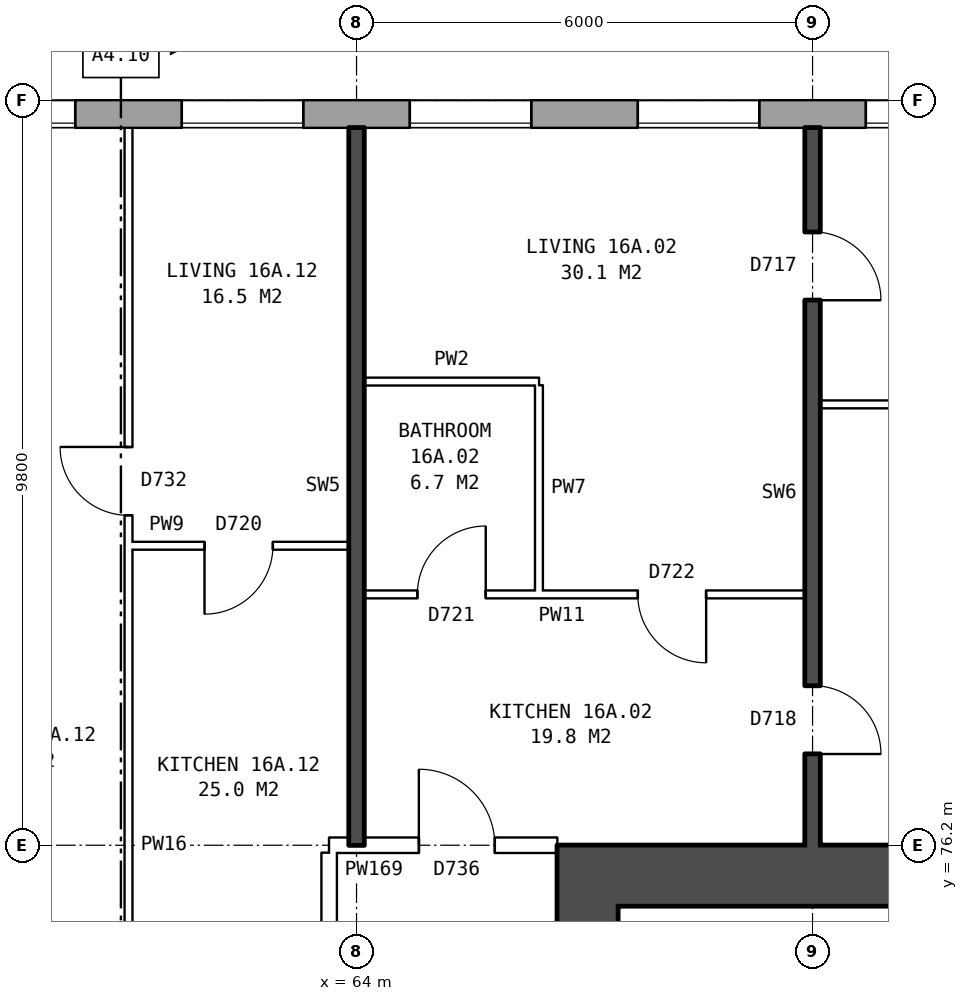
"""IFC4 building model, lengths in metres.
Left out: names, types, materials, properties, quantities, classifications, styles, units other than length and angle.
Written with IfcOpenShell. Run it as: python <this file> out.ifc"""

import sys

from ifc_helpers import new_model, si_unit, direction, frame, frame_2d, origin, place, context, subcontext, project, spatial, rectangle, extrude, element, fill, save


model = new_model("IFC4")
c1 = context("Model", 3, precision=1e-05, world=origin(), true_north=direction((0.0, 1.0)))
c2 = subcontext(c1, "Body", "Model", "MODEL_VIEW")
j1 = project(units=[si_unit("LENGTHUNIT", "METRE"), si_unit("PLANEANGLEUNIT", "RADIAN")], contexts=[c1])
p1 = place(None, origin())
s1 = spatial("IfcSite", under=j1, at=p1, CompositionType="ELEMENT")
p2 = place(p1, origin())
s2 = spatial("IfcBuilding", under=s1, at=p2, CompositionType="ELEMENT")
p3 = place(p2, frame((0.0, 0.0, 59.8)))
s3 = spatial("IfcBuildingStorey", under=s2, at=p3, CompositionType="ELEMENT", Elevation=59.8)
p4 = place(p3, frame((72.925, 85.82, 0.0), z_axis=(0.0, 0.0, 1.0), x_axis=(-1.0, 0.0, 0.0)))
e1 = element("IfcWall", 1, at=p4, inside=s3, PredefinedType="STANDARD", context=c2, shape_type="SweptSolid", body=[
    extrude(rectangle(XDim=48.351, YDim=0.36, at=frame_2d((24.175, 0.0))), origin(), (0.0, 0.0, 1.0), 2.85),
])
p5 = place(p4, frame((0.625, 0.0, 0.8)))
e2 = element("IfcOpeningElement", 2, at=p5, cuts=e1, PredefinedType="OPENING", context=c2, shape_type="SweptSolid", body=[
    extrude(rectangle(XDim=1.6, YDim=1.8, at=frame_2d((0.8, 0.9))), frame((0.0, 0.19, 0.0), z_axis=(0.0, -1.0, 0.0), x_axis=(1.0, 0.0, 0.0)), (0.0, 0.0, 1.0), 0.38),
])
p6 = place(p4, frame((3.625, 0.0, 0.8)))
e3 = element("IfcOpeningElement", 3, at=p6, cuts=e1, PredefinedType="OPENING", context=c2, shape_type="SweptSolid", body=[
    extrude(rectangle(XDim=1.6, YDim=1.8, at=frame_2d((0.8, 0.9))), frame((0.0, 0.19, 0.0), z_axis=(0.0, -1.0, 0.0), x_axis=(1.0, 0.0, 0.0)), (0.0, 0.0, 1.0), 0.38),
])
p7 = place(p4, frame((6.625, 0.0, 0.8)))
e4 = element("IfcOpeningElement", 4, at=p7, cuts=e1, PredefinedType="OPENING", context=c2, shape_type="SweptSolid", body=[
    extrude(rectangle(XDim=1.6, YDim=1.8, at=frame_2d((0.8, 0.9))), frame((0.0, 0.19, 0.0), z_axis=(0.0, -1.0, 0.0), x_axis=(1.0, 0.0, 0.0)), (0.0, 0.0, 1.0), 0.38),
])
p8 = place(p4, frame((9.625, 0.0, 0.8)))
e5 = element("IfcOpeningElement", 5, at=p8, cuts=e1, PredefinedType="OPENING", context=c2, shape_type="SweptSolid", body=[
    extrude(rectangle(XDim=1.6, YDim=1.8, at=frame_2d((0.8, 0.9))), frame((0.0, 0.19, 0.0), z_axis=(0.0, -1.0, 0.0), x_axis=(1.0, 0.0, 0.0)), (0.0, 0.0, 1.0), 0.38),
])
p9 = place(p4, frame((12.625, 0.0, 0.8)))
e6 = element("IfcOpeningElement", 6, at=p9, cuts=e1, PredefinedType="OPENING", context=c2, shape_type="SweptSolid", body=[
    extrude(rectangle(XDim=1.6, YDim=1.8, at=frame_2d((0.8, 0.9))), frame((0.0, 0.19, 0.0), z_axis=(0.0, -1.0, 0.0), x_axis=(1.0, 0.0, 0.0)), (0.0, 0.0, 1.0), 0.38),
])
p10 = place(p4, frame((15.625, 0.0, 0.8)))
e7 = element("IfcOpeningElement", 7, at=p10, cuts=e1, PredefinedType="OPENING", context=c2, shape_type="SweptSolid", body=[
    extrude(rectangle(XDim=1.6, YDim=1.8, at=frame_2d((0.8, 0.9))), frame((0.0, 0.19, 0.0), z_axis=(0.0, -1.0, 0.0), x_axis=(1.0, 0.0, 0.0)), (0.0, 0.0, 1.0), 0.38),
])
p11 = place(p4, frame((18.625, 0.0, 0.8)))
e8 = element("IfcOpeningElement", 8, at=p11, cuts=e1, PredefinedType="OPENING", context=c2, shape_type="SweptSolid", body=[
    extrude(rectangle(XDim=1.6, YDim=1.8, at=frame_2d((0.8, 0.9))), frame((0.0, 0.19, 0.0), z_axis=(0.0, -1.0, 0.0), x_axis=(1.0, 0.0, 0.0)), (0.0, 0.0, 1.0), 0.38),
])
p12 = place(p4, frame((21.125, 0.0, 1.65)))
e9 = element("IfcOpeningElement", 9, at=p12, cuts=e1, PredefinedType="OPENING", context=c2, shape_type="SweptSolid", body=[
    extrude(rectangle(XDim=0.8, YDim=0.9, at=frame_2d((0.4, 0.45))), frame((0.0, 0.19, 0.0), z_axis=(0.0, -1.0, 0.0), x_axis=(1.0, 0.0, 0.0)), (0.0, 0.0, 1.0), 0.38),
])
p13 = place(p4, frame((24.075, 0.0, 0.25)))
e10 = element("IfcOpeningElement", 10, at=p13, cuts=e1, PredefinedType="OPENING", context=c2, shape_type="SweptSolid", body=[
    extrude(rectangle(XDim=0.8, YDim=1.5, at=frame_2d((0.4, 0.75))), frame((0.0, 0.19, 0.0), z_axis=(0.0, -1.0, 0.0), x_axis=(1.0, 0.0, 0.0)), (0.0, 0.0, 1.0), 0.38),
])
p14 = place(p4, frame((27.625, 0.0, 0.8)))
e11 = element("IfcOpeningElement", 11, at=p14, cuts=e1, PredefinedType="OPENING", context=c2, shape_type="SweptSolid", body=[
    extrude(rectangle(XDim=1.6, YDim=1.8, at=frame_2d((0.8, 0.9))), frame((0.0, 0.19, 0.0), z_axis=(0.0, -1.0, 0.0), x_axis=(1.0, 0.0, 0.0)), (0.0, 0.0, 1.0), 0.38),
])
p15 = place(p4, frame((30.625, 0.0, 0.8)))
e12 = element("IfcOpeningElement", 12, at=p15, cuts=e1, PredefinedType="OPENING", context=c2, shape_type="SweptSolid", body=[
    extrude(rectangle(XDim=1.6, YDim=1.8, at=frame_2d((0.8, 0.9))), frame((0.0, 0.19, 0.0), z_axis=(0.0, -1.0, 0.0), x_axis=(1.0, 0.0, 0.0)), (0.0, 0.0, 1.0), 0.38),
])
p16 = place(p4, frame((33.625, 0.0, 0.8)))
e13 = element("IfcOpeningElement", 13, at=p16, cuts=e1, PredefinedType="OPENING", context=c2, shape_type="SweptSolid", body=[
    extrude(rectangle(XDim=1.6, YDim=1.8, at=frame_2d((0.8, 0.9))), frame((0.0, 0.19, 0.0), z_axis=(0.0, -1.0, 0.0), x_axis=(1.0, 0.0, 0.0)), (0.0, 0.0, 1.0), 0.38),
])
p17 = place(p4, frame((36.625, 0.0, 0.8)))
e14 = element("IfcOpeningElement", 14, at=p17, cuts=e1, PredefinedType="OPENING", context=c2, shape_type="SweptSolid", body=[
    extrude(rectangle(XDim=1.6, YDim=1.8, at=frame_2d((0.8, 0.9))), frame((0.0, 0.19, 0.0), z_axis=(0.0, -1.0, 0.0), x_axis=(1.0, 0.0, 0.0)), (0.0, 0.0, 1.0), 0.38),
])
p18 = place(p4, frame((39.625, 0.0, 0.8)))
e15 = element("IfcOpeningElement", 15, at=p18, cuts=e1, PredefinedType="OPENING", context=c2, shape_type="SweptSolid", body=[
    extrude(rectangle(XDim=1.6, YDim=1.8, at=frame_2d((0.8, 0.9))), frame((0.0, 0.19, 0.0), z_axis=(0.0, -1.0, 0.0), x_axis=(1.0, 0.0, 0.0)), (0.0, 0.0, 1.0), 0.38),
])
p19 = place(p4, frame((42.625, 0.0, 0.8)))
e16 = element("IfcOpeningElement", 16, at=p19, cuts=e1, PredefinedType="OPENING", context=c2, shape_type="SweptSolid", body=[
    extrude(rectangle(XDim=1.6, YDim=1.8, at=frame_2d((0.8, 0.9))), frame((0.0, 0.19, 0.0), z_axis=(0.0, -1.0, 0.0), x_axis=(1.0, 0.0, 0.0)), (0.0, 0.0, 1.0), 0.38),
])
p20 = place(p4, frame((45.625, 0.0, 0.8)))
e17 = element("IfcOpeningElement", 17, at=p20, cuts=e1, PredefinedType="OPENING", context=c2, shape_type="SweptSolid", body=[
    extrude(rectangle(XDim=1.6, YDim=1.8, at=frame_2d((0.8, 0.9))), frame((0.0, 0.19, 0.0), z_axis=(0.0, -1.0, 0.0), x_axis=(1.0, 0.0, 0.0)), (0.0, 0.0, 1.0), 0.38),
])
p21 = place(p4, frame((22.425, 0.0, 0.15)))
e18 = element("IfcOpeningElement", 18, at=p21, cuts=e1, PredefinedType="OPENING", context=c2, shape_type="SweptSolid", body=[
    extrude(rectangle(XDim=1.2, YDim=0.9, at=frame_2d((0.6, 0.45))), frame((0.0, 0.19, 0.0), z_axis=(0.0, -1.0, 0.0), x_axis=(1.0, 0.0, 0.0)), (0.0, 0.0, 1.0), 0.38),
])
p22 = place(p4, frame((25.175, 0.0, 0.25)))
e19 = element("IfcOpeningElement", 19, at=p22, cuts=e1, PredefinedType="OPENING", context=c2, shape_type="SweptSolid", body=[
    extrude(rectangle(XDim=0.6, YDim=0.9, at=frame_2d((0.3, 0.45))), frame((0.0, 0.19, 0.0), z_axis=(0.0, -1.0, 0.0), x_axis=(1.0, 0.0, 0.0)), (0.0, 0.0, 1.0), 0.38),
])
p23 = place(p3, frame((67.04, 64.6, 0.0), z_axis=(0.0, 0.0, 1.0), x_axis=(0.0, 1.0, 0.0)))
e20 = element("IfcWall", 20, at=p23, inside=s3, PredefinedType="SHEAR", context=c2, shape_type="SweptSolid", body=[
    extrude(rectangle(XDim=10.8, YDim=0.8, at=frame_2d((5.4, 0.0))), origin(), (0.0, 0.0, 1.0), 2.85),
])
p24 = place(p23, frame((0.525, 0.0, 0.0)))
e21 = element("IfcOpeningElement", 21, at=p24, cuts=e20, PredefinedType="OPENING", context=c2, shape_type="SweptSolid", body=[
    extrude(rectangle(XDim=1.1, YDim=2.1, at=frame_2d((0.55, 1.05))), frame((0.0, 0.41, 0.0), z_axis=(0.0, -1.0, 0.0), x_axis=(1.0, 0.0, 0.0)), (0.0, 0.0, 1.0), 0.82),
])
p25 = place(p23, frame((9.1, 0.0, 0.0)))
e22 = element("IfcOpeningElement", 22, at=p25, cuts=e20, PredefinedType="OPENING", context=c2, shape_type="SweptSolid", body=[
    extrude(rectangle(XDim=1.1, YDim=2.1, at=frame_2d((0.55, 1.05))), frame((0.0, 0.41, 0.0), z_axis=(0.0, -1.0, 0.0), x_axis=(1.0, 0.0, 0.0)), (0.0, 0.0, 1.0), 0.82),
])
p26 = place(p3, frame((66.64, 75.8, 0.0), z_axis=(0.0, 0.0, 1.0), x_axis=(1.0, 0.0, 0.0)))
e23 = element("IfcWall", 23, at=p26, inside=s3, PredefinedType="SHEAR", context=c2, shape_type="SweptSolid", body=[
    extrude(rectangle(XDim=9.0, YDim=0.8, at=frame_2d((4.5, 0.0))), origin(), (0.0, 0.0, 1.0), 2.85),
])
p27 = place(p3, frame((63.64, 63.9, 0.0), z_axis=(0.0, 0.0, 1.0), x_axis=(0.0, 1.0, 0.0)))
e24 = element("IfcWall", 24, at=p27, inside=s3, PredefinedType="PARTITIONING", context=c2, shape_type="SweptSolid", body=[
    extrude(rectangle(XDim=12.2, YDim=0.2, at=frame_2d((6.1, 0.0))), origin(), (0.0, 0.0, 1.0), 2.85),
])
p28 = place(p27, frame((5.1, 0.0, 0.0)))
e25 = element("IfcOpeningElement", 25, at=p28, cuts=e24, PredefinedType="OPENING", context=c2, shape_type="SweptSolid", body=[
    extrude(rectangle(XDim=2.0, YDim=2.1, at=frame_2d((1.0, 1.05))), frame((0.0, 0.11, 0.0), z_axis=(0.0, -1.0, 0.0), x_axis=(1.0, 0.0, 0.0)), (0.0, 0.0, 1.0), 0.22),
])
p29 = place(p3, frame((63.64, 76.2, 0.0), z_axis=(0.0, 0.0, 1.0), x_axis=(1.0, 0.0, 0.0)))
e26 = element("IfcWall", 26, at=p29, inside=s3, PredefinedType="PARTITIONING", context=c2, shape_type="SweptSolid", body=[
    extrude(rectangle(XDim=3.0, YDim=0.2, at=frame_2d((1.5, 0.0))), origin(), (0.0, 0.0, 1.0), 2.85),
])
p30 = place(p29, frame((1.18, 0.0, 0.0)))
e27 = element("IfcOpeningElement", 27, at=p30, cuts=e26, PredefinedType="OPENING", context=c2, shape_type="SweptSolid", body=[
    extrude(rectangle(XDim=1.0, YDim=2.1, at=frame_2d((0.5, 1.05))), frame((0.0, 0.11, 0.0), z_axis=(0.0, -1.0, 0.0), x_axis=(1.0, 0.0, 0.0)), (0.0, 0.0, 1.0), 0.22),
])
p31 = place(p3, frame((64.1, 79.5, 0.0), z_axis=(0.0, 0.0, 1.0), x_axis=(1.0, 0.0, 0.0)))
e28 = element("IfcWall", 28, at=p31, inside=s3, PredefinedType="PARTITIONING", context=c2, shape_type="SweptSolid", body=[
    extrude(rectangle(XDim=5.8, YDim=0.1, at=frame_2d((2.9, 0.0))), origin(), (0.0, 0.0, 1.0), 2.85),
])
p32 = place(p31, frame((3.6, 0.0, 0.0)))
e29 = element("IfcOpeningElement", 29, at=p32, cuts=e28, PredefinedType="OPENING", context=c2, shape_type="SweptSolid", body=[
    extrude(rectangle(XDim=0.9, YDim=2.1, at=frame_2d((0.45, 1.05))), frame((0.0, 0.06, 0.0), z_axis=(0.0, -1.0, 0.0), x_axis=(1.0, 0.0, 0.0)), (0.0, 0.0, 1.0), 0.12),
])
p33 = place(p31, frame((0.7, 0.0, 0.0)))
e30 = element("IfcOpeningElement", 30, at=p33, cuts=e28, PredefinedType="OPENING", context=c2, shape_type="SweptSolid", body=[
    extrude(rectangle(XDim=0.9, YDim=2.1, at=frame_2d((0.45, 1.05))), frame((0.0, 0.06, 0.0), z_axis=(0.0, -1.0, 0.0), x_axis=(1.0, 0.0, 0.0)), (0.0, 0.0, 1.0), 0.12),
])
p34 = place(p3, frame((61.0, 80.14, 0.0), z_axis=(0.0, 0.0, 1.0), x_axis=(1.0, 0.0, 0.0)))
e31 = element("IfcWall", 31, at=p34, inside=s3, PredefinedType="PARTITIONING", context=c2, shape_type="SweptSolid", body=[
    extrude(rectangle(XDim=2.9, YDim=0.1, at=frame_2d((1.45, 0.0))), origin(), (0.0, 0.0, 1.0), 2.85),
])
p35 = place(p34, frame((1.0, 0.0, 0.0)))
e32 = element("IfcOpeningElement", 32, at=p35, cuts=e31, PredefinedType="OPENING", context=c2, shape_type="SweptSolid", body=[
    extrude(rectangle(XDim=0.9, YDim=2.1, at=frame_2d((0.45, 1.05))), frame((0.0, 0.06, 0.0), z_axis=(0.0, -1.0, 0.0), x_axis=(1.0, 0.0, 0.0)), (0.0, 0.0, 1.0), 0.12),
])
p36 = place(p3, frame((70.1, 82.0, 0.0), z_axis=(0.0, 0.0, 1.0), x_axis=(1.0, 0.0, 0.0)))
e33 = element("IfcWall", 33, at=p36, inside=s3, PredefinedType="PARTITIONING", context=c2, shape_type="SweptSolid", body=[
    extrude(rectangle(XDim=5.54, YDim=0.1, at=frame_2d((2.77, 0.0))), origin(), (0.0, 0.0, 1.0), 2.85),
])
p37 = place(p3, frame((64.1, 82.3, 0.0), z_axis=(0.0, 0.0, 1.0), x_axis=(1.0, 0.0, 0.0)))
e34 = element("IfcWall", 34, at=p37, inside=s3, PredefinedType="PARTITIONING", context=c2, shape_type="SweptSolid", body=[
    extrude(rectangle(XDim=2.3, YDim=0.1, at=frame_2d((1.15, 0.0))), origin(), (0.0, 0.0, 1.0), 2.85),
])
p38 = place(p3, frame((61.0, 71.3, 0.0), z_axis=(0.0, 0.0, 1.0), x_axis=(0.0, 1.0, 0.0)))
e35 = element("IfcWall", 35, at=p38, inside=s3, PredefinedType="PARTITIONING", context=c2, shape_type="SweptSolid", body=[
    extrude(rectangle(XDim=14.34, YDim=0.1, at=frame_2d((7.17, 0.0))), origin(), (0.0, 0.0, 1.0), 2.85),
])
p39 = place(p38, frame((9.24, 0.0, 0.0)))
e36 = element("IfcOpeningElement", 36, at=p39, cuts=e35, PredefinedType="OPENING", context=c2, shape_type="SweptSolid", body=[
    extrude(rectangle(XDim=0.9, YDim=2.1, at=frame_2d((0.45, 1.05))), frame((0.0, 0.06, 0.0), z_axis=(0.0, -1.0, 0.0), x_axis=(1.0, 0.0, 0.0)), (0.0, 0.0, 1.0), 0.12),
])
p40 = place(p38, frame((0.9, 0.0, 0.0)))
e37 = element("IfcOpeningElement", 37, at=p40, cuts=e35, PredefinedType="OPENING", context=c2, shape_type="SweptSolid", body=[
    extrude(rectangle(XDim=0.9, YDim=2.1, at=frame_2d((0.45, 1.05))), frame((0.0, 0.06, 0.0), z_axis=(0.0, -1.0, 0.0), x_axis=(1.0, 0.0, 0.0)), (0.0, 0.0, 1.0), 0.12),
])
p41 = place(p3, frame((64.0, 76.2, 0.0), z_axis=(0.0, 0.0, 1.0), x_axis=(0.0, 1.0, 0.0)))
e38 = element("IfcWall", 38, at=p41, inside=s3, PredefinedType="SOLIDWALL", context=c2, shape_type="SweptSolid", body=[
    extrude(rectangle(XDim=9.44, YDim=0.2, at=frame_2d((4.72, 0.0))), origin(), (0.0, 0.0, 1.0), 2.85),
])
p42 = place(p3, frame((66.4, 79.55, 0.0), z_axis=(0.0, 0.0, 1.0), x_axis=(0.0, 1.0, 0.0)))
e39 = element("IfcWall", 39, at=p42, inside=s3, PredefinedType="PARTITIONING", context=c2, shape_type="SweptSolid", body=[
    extrude(rectangle(XDim=2.7, YDim=0.1, at=frame_2d((1.35, 0.0))), origin(), (0.0, 0.0, 1.0), 2.85),
])
p43 = place(p3, frame((70.0, 76.2, 0.0), z_axis=(0.0, 0.0, 1.0), x_axis=(0.0, 1.0, 0.0)))
e40 = element("IfcWall", 40, at=p43, inside=s3, PredefinedType="SOLIDWALL", context=c2, shape_type="SweptSolid", body=[
    extrude(rectangle(XDim=9.44, YDim=0.2, at=frame_2d((4.72, 0.0))), origin(), (0.0, 0.0, 1.0), 2.85),
])
p44 = place(p43, frame((7.17, 0.0, 0.0)))
e41 = element("IfcOpeningElement", 41, at=p44, cuts=e40, PredefinedType="OPENING", context=c2, shape_type="SweptSolid", body=[
    extrude(rectangle(XDim=0.9, YDim=2.1, at=frame_2d((0.45, 1.05))), frame((0.0, 0.11, 0.0), z_axis=(0.0, -1.0, 0.0), x_axis=(1.0, 0.0, 0.0)), (0.0, 0.0, 1.0), 0.22),
])
p45 = place(p43, frame((1.2, 0.0, 0.0)))
e42 = element("IfcOpeningElement", 42, at=p45, cuts=e40, PredefinedType="OPENING", context=c2, shape_type="SweptSolid", body=[
    extrude(rectangle(XDim=0.9, YDim=2.1, at=frame_2d((0.45, 1.05))), frame((0.0, 0.11, 0.0), z_axis=(0.0, -1.0, 0.0), x_axis=(1.0, 0.0, 0.0)), (0.0, 0.0, 1.0), 0.22),
])
p46 = place(p5, origin())
e43 = element("IfcWindow", 43, at=p46, inside=s3, PartitioningType="SINGLE_PANEL", PredefinedType="WINDOW", context=c2, shape_type="SweptSolid", body=[
    extrude(rectangle(XDim=1.6, YDim=1.8, at=frame_2d((0.8, 0.9))), frame((0.0, 0.15, 0.0), z_axis=(0.0, -1.0, 0.0), x_axis=(1.0, 0.0, 0.0)), (0.0, 0.0, 1.0), 0.06),
])
fill(e2, e43)
p47 = place(p6, origin())
e44 = element("IfcWindow", 44, at=p47, inside=s3, PartitioningType="SINGLE_PANEL", PredefinedType="WINDOW", context=c2, shape_type="SweptSolid", body=[
    extrude(rectangle(XDim=1.6, YDim=1.8, at=frame_2d((0.8, 0.9))), frame((0.0, 0.15, 0.0), z_axis=(0.0, -1.0, 0.0), x_axis=(1.0, 0.0, 0.0)), (0.0, 0.0, 1.0), 0.06),
])
fill(e3, e44)
p48 = place(p7, origin())
e45 = element("IfcWindow", 45, at=p48, inside=s3, PartitioningType="SINGLE_PANEL", PredefinedType="WINDOW", context=c2, shape_type="SweptSolid", body=[
    extrude(rectangle(XDim=1.6, YDim=1.8, at=frame_2d((0.8, 0.9))), frame((0.0, 0.15, 0.0), z_axis=(0.0, -1.0, 0.0), x_axis=(1.0, 0.0, 0.0)), (0.0, 0.0, 1.0), 0.06),
])
fill(e4, e45)
p49 = place(p8, origin())
e46 = element("IfcWindow", 46, at=p49, inside=s3, PartitioningType="SINGLE_PANEL", PredefinedType="WINDOW", context=c2, shape_type="SweptSolid", body=[
    extrude(rectangle(XDim=1.6, YDim=1.8, at=frame_2d((0.8, 0.9))), frame((0.0, 0.15, 0.0), z_axis=(0.0, -1.0, 0.0), x_axis=(1.0, 0.0, 0.0)), (0.0, 0.0, 1.0), 0.06),
])
fill(e5, e46)
p50 = place(p9, origin())
e47 = element("IfcWindow", 47, at=p50, inside=s3, PartitioningType="SINGLE_PANEL", PredefinedType="WINDOW", context=c2, shape_type="SweptSolid", body=[
    extrude(rectangle(XDim=1.6, YDim=1.8, at=frame_2d((0.8, 0.9))), frame((0.0, 0.15, 0.0), z_axis=(0.0, -1.0, 0.0), x_axis=(1.0, 0.0, 0.0)), (0.0, 0.0, 1.0), 0.06),
])
fill(e6, e47)
p51 = place(p44, frame((0.9, 0.0, 0.0), z_axis=(0.0, 0.0, 1.0), x_axis=(-1.0, 0.0, 0.0)))
e48 = element("IfcDoor", 48, at=p51, inside=s3, OperationType="SINGLE_SWING_RIGHT", PredefinedType="DOOR", context=c2, shape_type="SweptSolid", body=[
    extrude(rectangle(XDim=0.9, YDim=2.1, at=frame_2d((0.45, 1.05))), frame((0.0, 0.025, 0.0), z_axis=(0.0, -1.0, 0.0), x_axis=(1.0, 0.0, 0.0)), (0.0, 0.0, 1.0), 0.05),
])
fill(e41, e48)
p52 = place(p45, frame((0.9, 0.0, 0.0), z_axis=(0.0, 0.0, 1.0), x_axis=(-1.0, 0.0, 0.0)))
e49 = element("IfcDoor", 49, at=p52, inside=s3, OperationType="SINGLE_SWING_RIGHT", PredefinedType="DOOR", context=c2, shape_type="SweptSolid", body=[
    extrude(rectangle(XDim=0.9, YDim=2.1, at=frame_2d((0.45, 1.05))), frame((0.0, 0.025, 0.0), z_axis=(0.0, -1.0, 0.0), x_axis=(1.0, 0.0, 0.0)), (0.0, 0.0, 1.0), 0.05),
])
fill(e42, e49)
p53 = place(p30, origin())
e50 = element("IfcDoor", 50, at=p53, inside=s3, OperationType="SINGLE_SWING_LEFT", PredefinedType="DOOR", context=c2, shape_type="SweptSolid", body=[
    extrude(rectangle(XDim=1.0, YDim=2.1, at=frame_2d((0.5, 1.05))), frame((0.0, 0.025, 0.0), z_axis=(0.0, -1.0, 0.0), x_axis=(1.0, 0.0, 0.0)), (0.0, 0.0, 1.0), 0.05),
])
fill(e27, e50)
p54 = place(p32, frame((0.9, 0.0, 0.0), z_axis=(0.0, 0.0, 1.0), x_axis=(-1.0, 0.0, 0.0)))
e51 = element("IfcDoor", 51, at=p54, inside=s3, OperationType="SINGLE_SWING_LEFT", PredefinedType="DOOR", context=c2, shape_type="SweptSolid", body=[
    extrude(rectangle(XDim=0.9, YDim=2.1, at=frame_2d((0.45, 1.05))), frame((0.0, 0.025, 0.0), z_axis=(0.0, -1.0, 0.0), x_axis=(1.0, 0.0, 0.0)), (0.0, 0.0, 1.0), 0.05),
])
fill(e29, e51)
p55 = place(p33, origin())
e52 = element("IfcDoor", 52, at=p55, inside=s3, OperationType="SINGLE_SWING_RIGHT", PredefinedType="DOOR", context=c2, shape_type="SweptSolid", body=[
    extrude(rectangle(XDim=0.9, YDim=2.1, at=frame_2d((0.45, 1.05))), frame((0.0, 0.025, 0.0), z_axis=(0.0, -1.0, 0.0), x_axis=(1.0, 0.0, 0.0)), (0.0, 0.0, 1.0), 0.05),
])
fill(e30, e52)
p56 = place(p39, origin())
e53 = element("IfcDoor", 53, at=p56, inside=s3, OperationType="SINGLE_SWING_RIGHT", PredefinedType="DOOR", context=c2, shape_type="SweptSolid", body=[
    extrude(rectangle(XDim=0.9, YDim=2.1, at=frame_2d((0.45, 1.05))), frame((0.0, 0.025, 0.0), z_axis=(0.0, -1.0, 0.0), x_axis=(1.0, 0.0, 0.0)), (0.0, 0.0, 1.0), 0.05),
])
fill(e36, e53)
p57 = place(p35, frame((0.9, 0.0, 0.0), z_axis=(0.0, 0.0, 1.0), x_axis=(-1.0, 0.0, 0.0)))
e54 = element("IfcDoor", 54, at=p57, inside=s3, OperationType="SINGLE_SWING_RIGHT", PredefinedType="DOOR", context=c2, shape_type="SweptSolid", body=[
    extrude(rectangle(XDim=0.9, YDim=2.1, at=frame_2d((0.45, 1.05))), frame((0.0, 0.025, 0.0), z_axis=(0.0, -1.0, 0.0), x_axis=(1.0, 0.0, 0.0)), (0.0, 0.0, 1.0), 0.05),
])
fill(e32, e54)
save(model, sys.argv[1])
